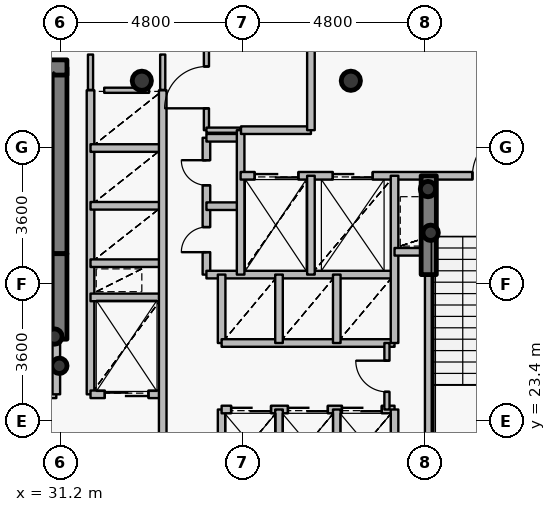
"""IFC4 building model, lengths in metres.
Left out: names, types, materials, properties, quantities, classifications, styles, units other than length and angle.
Written with IfcOpenShell. Run it as: python <this file> out.ifc"""

import sys

from ifc_helpers import new_model, si_unit, direction, frame, frame_2d, origin, origin_2d, place, context, subcontext, project, spatial, rectangle, hollow_circle, extrude, source, transform, mapped, element, fill, save


model = new_model("IFC4")
c1 = context("Model", 3, precision=1e-05, world=origin(), true_north=direction((0.0, 1.0)))
c2 = subcontext(c1, "Body", "Model", "MODEL_VIEW")
j1 = project(units=[si_unit("LENGTHUNIT", "METRE"), si_unit("PLANEANGLEUNIT", "RADIAN")], contexts=[c1])
p1 = place(None, origin())
s1 = spatial("IfcSite", under=j1, at=p1, CompositionType="ELEMENT")
p2 = place(p1, origin())
s2 = spatial("IfcBuilding", under=s1, at=p2, CompositionType="ELEMENT")
p3 = place(p2, frame((0.0, 0.0, 74.4)))
s3 = spatial("IfcBuildingStorey", under=s2, at=p3, CompositionType="ELEMENT", Elevation=74.4)
for number, where, z_axis, x_axis in (
    (1, (38.85, 32.35, 0.0), (0.0, 0.0, 1.0), (1.0, 0.0, 0.0)),
    (2, (33.35, 32.35, 0.0), (0.0, 0.0, 1.0), (1.0, 0.0, 0.0)),
):
    element("IfcColumn", number, at=place(p3, frame(where, z_axis=z_axis, x_axis=x_axis)), inside=s3, PredefinedType="COLUMN", context=c2, shape_type="SweptSolid", body=[
        extrude(hollow_circle(Radius=0.254, WallThickness=0.02, at=origin_2d()), origin(), (0.0, 0.0, 1.0), 4.2),
    ])
p4 = place(p3, frame((31.18, 27.8, 0.0), z_axis=(0.0, 0.0, 1.0), x_axis=(0.0, 1.0, 0.0)))
e3 = element("IfcWall", 3, at=p4, inside=s3, PredefinedType="SHEAR", context=c2, shape_type="SweptSolid", body=[
    extrude(rectangle(XDim=4.9, YDim=0.4, at=frame_2d((2.45, 0.0))), origin(), (0.0, 0.0, 1.0), 4.2),
])
p5 = place(p3, frame((27.28, 32.7, 0.0), z_axis=(0.0, 0.0, 1.0), x_axis=(1.0, 0.0, 0.0)))
e4 = element("IfcWall", 4, at=p5, inside=s3, PredefinedType="SHEAR", context=c2, shape_type="SweptSolid", body=[
    extrude(rectangle(XDim=4.1, YDim=0.4, at=frame_2d((2.05, 0.0))), origin(), (0.0, 0.0, 1.0), 4.2),
])
for number, where, z_axis, x_axis in (
    (5, (31.05, 25.62, 0.0), (0.0, 0.0, 1.0), (1.0, 0.0, 0.0)),
    (6, (31.18, 24.85, 0.0), (0.0, 0.0, 1.0), (1.0, 0.0, 0.0)),
    (7, (40.95, 28.35, 0.0), (0.0, 0.0, 1.0), (1.0, 0.0, 0.0)),
    (8, (40.88, 29.5, 0.0), (0.0, 0.0, 1.0), (1.0, 0.0, 0.0)),
):
    element("IfcColumn", number, at=place(p3, frame(where, z_axis=z_axis, x_axis=x_axis)), inside=s3, PredefinedType="COLUMN", context=c2, shape_type="SweptSolid", body=[
        extrude(hollow_circle(Radius=0.203, WallThickness=0.016, at=origin_2d()), origin(), (0.0, 0.0, 1.0), 4.2),
    ])
p6 = place(p3, frame((31.18, 25.55, 0.0), z_axis=(0.0, 0.0, 1.0), x_axis=(0.0, 1.0, 0.0)))
e9 = element("IfcWall", 9, at=p6, inside=s3, PredefinedType="SHEAR", context=c2, shape_type="SweptSolid", body=[
    extrude(rectangle(XDim=2.25, YDim=0.4, at=frame_2d((1.125, 0.0))), origin(), (0.0, 0.0, 1.0), 3.55),
])
p7 = place(p3, frame((40.9, 27.25, 0.0), z_axis=(0.0, 0.0, 1.0), x_axis=(0.0, 1.0, 0.0)))
e10 = element("IfcWall", 10, at=p7, inside=s3, PredefinedType="SHEAR", context=c2, shape_type="SweptSolid", body=[
    extrude(rectangle(XDim=2.6, YDim=0.4, at=frame_2d((1.3, 0.0))), origin(), (0.0, 0.0, 1.0), 3.55),
])
p8 = place(p3, frame((27.56, 24.1, 0.0), z_axis=(0.0, 0.0, 1.0), x_axis=(1.0, 0.0, 0.0)))
e11 = element("IfcWall", 11, at=p8, inside=s3, PredefinedType="PARTITIONING", context=c2, shape_type="SweptSolid", body=[
    extrude(rectangle(XDim=3.54, YDim=0.2, at=frame_2d((1.77, 0.0))), origin(), (0.0, 0.0, 1.0), 3.95),
])
p9 = place(p8, frame((1.17, 0.0, 0.0)))
e12 = element("IfcOpeningElement", 12, at=p9, cuts=e11, PredefinedType="OPENING", context=c2, shape_type="SweptSolid", body=[
    extrude(rectangle(XDim=1.2, YDim=2.15, at=origin_2d()), frame((0.6, 0.11, 1.075), z_axis=(0.0, -1.0, 0.0), x_axis=(1.0, 0.0, 0.0)), (0.0, 0.0, 1.0), 0.22),
])
p10 = place(p3, frame((31.1, 24.1, 0.0), z_axis=(0.0, 0.0, 1.0), x_axis=(0.0, 1.0, 0.0)))
e13 = element("IfcWall", 13, at=p10, inside=s3, PredefinedType="PARTITIONING", context=c2, shape_type="SweptSolid", body=[
    extrude(rectangle(XDim=1.44, YDim=0.2, at=frame_2d((0.72, 0.0))), origin(), (0.0, 0.0, 1.0), 3.95),
])
p11 = place(p3, frame((32.0, 24.1, 0.0), z_axis=(0.0, 0.0, 1.0), x_axis=(0.0, 1.0, 0.0)))
e14 = element("IfcWall", 14, at=p11, inside=s3, PredefinedType="PARTITIONING", context=c2, shape_type="SweptSolid", body=[
    extrude(rectangle(XDim=8.0, YDim=0.2, at=frame_2d((4.0, 0.0))), origin(), (0.0, 0.0, 1.0), 3.95),
])
p12 = place(p3, frame((32.0, 24.1, 0.0), z_axis=(0.0, 0.0, 1.0), x_axis=(1.0, 0.0, 0.0)))
e15 = element("IfcWall", 15, at=p12, inside=s3, PredefinedType="PARTITIONING", context=c2, shape_type="SweptSolid", body=[
    extrude(rectangle(XDim=1.9, YDim=0.2, at=frame_2d((0.95, 0.0))), origin(), (0.0, 0.0, 1.0), 3.535),
])
p13 = place(p12, frame((0.375, 0.0, 0.0)))
e16 = element("IfcOpeningElement", 16, at=p13, cuts=e15, PredefinedType="OPENING", context=c2, shape_type="SweptSolid", body=[
    extrude(rectangle(XDim=1.15, YDim=2.15, at=origin_2d()), frame((0.575, 0.11, 1.075), z_axis=(0.0, -1.0, 0.0), x_axis=(1.0, 0.0, 0.0)), (0.0, 0.0, 1.0), 0.22),
])
for number, where, z_axis, x_axis in (
    (17, (32.0, 26.65, 0.0), (0.0, 0.0, 1.0), (1.0, 0.0, 0.0)),
    (18, (32.0, 27.55, 0.0), (0.0, 0.0, 1.0), (1.0, 0.0, 0.0)),
    (19, (32.0, 29.06, 0.0), (0.0, 0.0, 1.0), (1.0, 0.0, 0.0)),
    (20, (32.0, 30.58, 0.0), (0.0, 0.0, 1.0), (1.0, 0.0, 0.0)),
):
    element("IfcWall", number, at=place(p3, frame(where, z_axis=z_axis, x_axis=x_axis)), inside=s3, PredefinedType="PARTITIONING", context=c2, shape_type="SweptSolid", body=[
        extrude(rectangle(XDim=1.9, YDim=0.2, at=frame_2d((0.95, 0.0))), origin(), (0.0, 0.0, 1.0), 3.535),
    ])
p14 = place(p3, frame((33.9, 20.7, 0.0), z_axis=(0.0, 0.0, 1.0), x_axis=(0.0, 1.0, 0.0)))
e21 = element("IfcWall", 21, at=p14, inside=s3, PredefinedType="PARTITIONING", context=c2, shape_type="SweptSolid", body=[
    extrude(rectangle(XDim=11.4, YDim=0.2, at=frame_2d((5.7, 0.0))), origin(), (0.0, 0.0, 1.0), 3.535),
])
p15 = place(p3, frame((35.05, 27.25, 0.0), z_axis=(0.0, 0.0, 1.0), x_axis=(0.0, 1.0, 0.0)))
e22 = element("IfcWall", 22, at=p15, inside=s3, PredefinedType="PARTITIONING", context=c2, shape_type="SweptSolid", body=[
    extrude(rectangle(XDim=3.6, YDim=0.2, at=frame_2d((1.8, 0.0))), origin(), (0.0, 0.0, 1.0), 3.95),
])
p16 = place(p15, frame((0.59, 0.0, 0.0)))
e23 = element("IfcOpeningElement", 23, at=p16, cuts=e22, PredefinedType="OPENING", context=c2, shape_type="SweptSolid", body=[
    extrude(rectangle(XDim=0.66, YDim=2.05, at=origin_2d()), frame((0.33, 0.11, 1.025), z_axis=(0.0, -1.0, 0.0), x_axis=(1.0, 0.0, 0.0)), (0.0, 0.0, 1.0), 0.22),
])
p17 = place(p15, frame((2.35, 0.0, 0.0)))
e24 = element("IfcOpeningElement", 24, at=p17, cuts=e22, PredefinedType="OPENING", context=c2, shape_type="SweptSolid", body=[
    extrude(rectangle(XDim=0.66, YDim=2.05, at=origin_2d()), frame((0.33, 0.11, 1.025), z_axis=(0.0, -1.0, 0.0), x_axis=(1.0, 0.0, 0.0)), (0.0, 0.0, 1.0), 0.22),
])
p18 = place(p3, frame((35.05, 27.25, 0.0), z_axis=(0.0, 0.0, 1.0), x_axis=(1.0, 0.0, 0.0)))
e25 = element("IfcWall", 25, at=p18, inside=s3, PredefinedType="PARTITIONING", context=c2, shape_type="SweptSolid", body=[
    extrude(rectangle(XDim=4.95, YDim=0.2, at=frame_2d((2.475, 0.0))), origin(), (0.0, 0.0, 1.0), 3.535),
])
for number, where, z_axis, x_axis in (
    (26, (35.05, 29.05, 0.0), (0.0, 0.0, 1.0), (1.0, 0.0, 0.0)),
    (27, (35.05, 30.85, 0.0), (0.0, 0.0, 1.0), (1.0, 0.0, 0.0)),
):
    element("IfcWall", number, at=place(p3, frame(where, z_axis=z_axis, x_axis=x_axis)), inside=s3, PredefinedType="PARTITIONING", context=c2, shape_type="SweptSolid", body=[
        extrude(rectangle(XDim=0.9, YDim=0.2, at=frame_2d((0.45, 0.0))), origin(), (0.0, 0.0, 1.0), 3.95),
    ])
p19 = place(p3, frame((35.05, 31.05, 0.0), z_axis=(0.0, 0.0, 1.0), x_axis=(0.0, 1.0, 0.0)))
e28 = element("IfcWall", 28, at=p19, inside=s3, PredefinedType="PARTITIONING", context=c2, shape_type="SweptSolid", body=[
    extrude(rectangle(XDim=2.25, YDim=0.135, at=frame_2d((1.125, 0.0))), origin(), (0.0, 0.0, 1.0), 3.535),
])
p20 = place(p19, frame((0.575, 0.0, 0.0)))
e29 = element("IfcOpeningElement", 29, at=p20, cuts=e28, PredefinedType="OPENING", context=c2, shape_type="SweptSolid", body=[
    extrude(rectangle(XDim=1.1, YDim=2.15, at=origin_2d()), frame((0.55, 0.078, 1.075), z_axis=(0.0, -1.0, 0.0), x_axis=(1.0, 0.0, 0.0)), (0.0, 0.0, 1.0), 0.155),
])
p21 = place(p3, frame((35.05, 31.05, 0.0), z_axis=(0.0, 0.0, 1.0), x_axis=(1.0, 0.0, 0.0)))
e30 = element("IfcWall", 30, at=p21, inside=s3, PredefinedType="PARTITIONING", context=c2, shape_type="SweptSolid", body=[
    extrude(rectangle(XDim=0.9, YDim=0.135, at=frame_2d((0.45, 0.0))), origin(), (0.0, 0.0, 1.0), 3.95),
])
p22 = place(p3, frame((35.45, 21.9, 0.0), z_axis=(0.0, 0.0, 1.0), x_axis=(0.0, 1.0, 0.0)))
e31 = element("IfcWall", 31, at=p22, inside=s3, PredefinedType="PARTITIONING", context=c2, shape_type="SweptSolid", body=[
    extrude(rectangle(XDim=1.8, YDim=0.2, at=frame_2d((0.9, 0.0))), origin(), (0.0, 0.0, 1.0), 3.95),
])
p23 = place(p3, frame((35.45, 23.7, 0.0), z_axis=(0.0, 0.0, 1.0), x_axis=(1.0, 0.0, 0.0)))
e32 = element("IfcWall", 32, at=p23, inside=s3, PredefinedType="PARTITIONING", context=c2, shape_type="SweptSolid", body=[
    extrude(rectangle(XDim=4.55, YDim=0.2, at=frame_2d((2.275, 0.0))), origin(), (0.0, 0.0, 1.0), 3.535),
])
p24 = place(p23, frame((0.25, 0.0, 0.0)))
e33 = element("IfcOpeningElement", 33, at=p24, cuts=e32, PredefinedType="OPENING", context=c2, shape_type="SweptSolid", body=[
    extrude(rectangle(XDim=1.05, YDim=2.15, at=origin_2d()), frame((0.525, 0.11, 1.075), z_axis=(0.0, -1.0, 0.0), x_axis=(1.0, 0.0, 0.0)), (0.0, 0.0, 1.0), 0.22),
])
p25 = place(p23, frame((1.745, 0.0, 0.0)))
e34 = element("IfcOpeningElement", 34, at=p25, cuts=e32, PredefinedType="OPENING", context=c2, shape_type="SweptSolid", body=[
    extrude(rectangle(XDim=1.05, YDim=2.15, at=origin_2d()), frame((0.525, 0.11, 1.075), z_axis=(0.0, -1.0, 0.0), x_axis=(1.0, 0.0, 0.0)), (0.0, 0.0, 1.0), 0.22),
])
p26 = place(p23, frame((3.165, 0.0, 0.0)))
e35 = element("IfcOpeningElement", 35, at=p26, cuts=e32, PredefinedType="OPENING", context=c2, shape_type="SweptSolid", body=[
    extrude(rectangle(XDim=1.05, YDim=2.15, at=origin_2d()), frame((0.525, 0.11, 1.075), z_axis=(0.0, -1.0, 0.0), x_axis=(1.0, 0.0, 0.0)), (0.0, 0.0, 1.0), 0.22),
])
p27 = place(p3, frame((35.45, 25.45, 0.0), z_axis=(0.0, 0.0, 1.0), x_axis=(0.0, 1.0, 0.0)))
e36 = element("IfcWall", 36, at=p27, inside=s3, PredefinedType="PARTITIONING", context=c2, shape_type="SweptSolid", body=[
    extrude(rectangle(XDim=1.8, YDim=0.2, at=frame_2d((0.9, 0.0))), origin(), (0.0, 0.0, 1.0), 3.95),
])
p28 = place(p3, frame((35.45, 25.45, 0.0), z_axis=(0.0, 0.0, 1.0), x_axis=(1.0, 0.0, 0.0)))
e37 = element("IfcWall", 37, at=p28, inside=s3, PredefinedType="PARTITIONING", context=c2, shape_type="SweptSolid", body=[
    extrude(rectangle(XDim=4.55, YDim=0.2, at=frame_2d((2.275, 0.0))), origin(), (0.0, 0.0, 1.0), 3.535),
])
p29 = place(p3, frame((35.95, 27.25, 0.0), z_axis=(0.0, 0.0, 1.0), x_axis=(0.0, 1.0, 0.0)))
e38 = element("IfcWall", 38, at=p29, inside=s3, PredefinedType="PARTITIONING", context=c2, shape_type="SweptSolid", body=[
    extrude(rectangle(XDim=3.8, YDim=0.2, at=frame_2d((1.9, 0.0))), origin(), (0.0, 0.0, 1.0), 3.95),
])
p30 = place(p3, frame((35.95, 29.85, 0.0), z_axis=(0.0, 0.0, 1.0), x_axis=(1.0, 0.0, 0.0)))
e39 = element("IfcWall", 39, at=p30, inside=s3, PredefinedType="PARTITIONING", context=c2, shape_type="SweptSolid", body=[
    extrude(rectangle(XDim=8.49, YDim=0.2, at=frame_2d((4.245, 0.0))), origin(), (0.0, 0.0, 1.0), 3.535),
])
p31 = place(p30, frame((6.1, 0.0, 0.0)))
e40 = element("IfcOpeningElement", 40, at=p31, cuts=e39, PredefinedType="OPENING", context=c2, shape_type="SweptSolid", body=[
    extrude(rectangle(XDim=1.2, YDim=2.15, at=origin_2d()), frame((0.6, 0.11, 1.075), z_axis=(0.0, -1.0, 0.0), x_axis=(1.0, 0.0, 0.0)), (0.0, 0.0, 1.0), 0.22),
])
p32 = place(p30, frame((0.37, 0.0, 0.0)))
e41 = element("IfcOpeningElement", 41, at=p32, cuts=e39, PredefinedType="OPENING", context=c2, shape_type="SweptSolid", body=[
    extrude(rectangle(XDim=1.15, YDim=2.15, at=origin_2d()), frame((0.575, 0.11, 1.075), z_axis=(0.0, -1.0, 0.0), x_axis=(1.0, 0.0, 0.0)), (0.0, 0.0, 1.0), 0.22),
])
p33 = place(p30, frame((2.425, 0.0, 0.0)))
e42 = element("IfcOpeningElement", 42, at=p33, cuts=e39, PredefinedType="OPENING", context=c2, shape_type="SweptSolid", body=[
    extrude(rectangle(XDim=1.05, YDim=2.15, at=origin_2d()), frame((0.525, 0.11, 1.075), z_axis=(0.0, -1.0, 0.0), x_axis=(1.0, 0.0, 0.0)), (0.0, 0.0, 1.0), 0.22),
])
p34 = place(p3, frame((35.96, 31.05, 0.0), z_axis=(0.0, 0.0, 1.0), x_axis=(1.0, 0.0, 0.0)))
e43 = element("IfcWall", 43, at=p34, inside=s3, PredefinedType="PARTITIONING", context=c2, shape_type="SweptSolid", body=[
    extrude(rectangle(XDim=1.84, YDim=0.2, at=frame_2d((0.92, 0.0))), origin(), (0.0, 0.0, 1.0), 3.95),
])
for number, where, z_axis, x_axis in (
    (44, (36.96, 21.9, 0.0), (0.0, 0.0, 1.0), (0.0, 1.0, 0.0)),
    (45, (36.96, 25.45, 0.0), (0.0, 0.0, 1.0), (0.0, 1.0, 0.0)),
):
    element("IfcWall", number, at=place(p3, frame(where, z_axis=z_axis, x_axis=x_axis)), inside=s3, PredefinedType="PARTITIONING", context=c2, shape_type="SweptSolid", body=[
        extrude(rectangle(XDim=1.8, YDim=0.2, at=frame_2d((0.9, 0.0))), origin(), (0.0, 0.0, 1.0), 3.95),
    ])
p35 = place(p3, frame((37.8, 27.25, 0.0), z_axis=(0.0, 0.0, 1.0), x_axis=(0.0, 1.0, 0.0)))
e46 = element("IfcWall", 46, at=p35, inside=s3, PredefinedType="PARTITIONING", context=c2, shape_type="SweptSolid", body=[
    extrude(rectangle(XDim=2.6, YDim=0.2, at=frame_2d((1.3, 0.0))), origin(), (0.0, 0.0, 1.0), 3.95),
])
p36 = place(p3, frame((37.8, 31.05, 0.0), z_axis=(0.0, 0.0, 1.0), x_axis=(0.0, 1.0, 0.0)))
e47 = element("IfcWall", 47, at=p36, inside=s3, PredefinedType="PARTITIONING", context=c2, shape_type="SweptSolid", body=[
    extrude(rectangle(XDim=2.25, YDim=0.2, at=frame_2d((1.125, 0.0))), origin(), (0.0, 0.0, 1.0), 3.535),
])
for number, where, z_axis, x_axis in (
    (48, (38.48, 21.9, 0.0), (0.0, 0.0, 1.0), (0.0, 1.0, 0.0)),
    (49, (38.48, 25.45, 0.0), (0.0, 0.0, 1.0), (0.0, 1.0, 0.0)),
):
    element("IfcWall", number, at=place(p3, frame(where, z_axis=z_axis, x_axis=x_axis)), inside=s3, PredefinedType="PARTITIONING", context=c2, shape_type="SweptSolid", body=[
        extrude(rectangle(XDim=1.8, YDim=0.2, at=frame_2d((0.9, 0.0))), origin(), (0.0, 0.0, 1.0), 3.95),
    ])
p37 = place(p3, frame((39.8, 23.7, 0.0), z_axis=(0.0, 0.0, 1.0), x_axis=(0.0, 1.0, 0.0)))
e50 = element("IfcWall", 50, at=p37, inside=s3, PredefinedType="PARTITIONING", context=c2, shape_type="SweptSolid", body=[
    extrude(rectangle(XDim=1.75, YDim=0.135, at=frame_2d((0.875, 0.0))), origin(), (0.0, 0.0, 1.0), 3.95),
])
p38 = place(p37, frame((0.465, 0.0, 0.0)))
e51 = element("IfcOpeningElement", 51, at=p38, cuts=e50, PredefinedType="OPENING", context=c2, shape_type="SweptSolid", body=[
    extrude(rectangle(XDim=0.82, YDim=2.1, at=origin_2d()), frame((0.41, 0.078, 1.05), z_axis=(0.0, -1.0, 0.0), x_axis=(1.0, 0.0, 0.0)), (0.0, 0.0, 1.0), 0.155),
])
p39 = place(p3, frame((40.0, 21.9, 0.0), z_axis=(0.0, 0.0, 1.0), x_axis=(0.0, 1.0, 0.0)))
e52 = element("IfcWall", 52, at=p39, inside=s3, PredefinedType="PARTITIONING", context=c2, shape_type="SweptSolid", body=[
    extrude(rectangle(XDim=1.8, YDim=0.2, at=frame_2d((0.9, 0.0))), origin(), (0.0, 0.0, 1.0), 3.95),
])
p40 = place(p3, frame((40.0, 25.45, 0.0), z_axis=(0.0, 0.0, 1.0), x_axis=(0.0, 1.0, 0.0)))
e53 = element("IfcWall", 53, at=p40, inside=s3, PredefinedType="PARTITIONING", context=c2, shape_type="SweptSolid", body=[
    extrude(rectangle(XDim=4.4, YDim=0.2, at=frame_2d((2.2, 0.0))), origin(), (0.0, 0.0, 1.0), 3.95),
])
p41 = place(p3, frame((40.0, 27.85, 0.0), z_axis=(0.0, 0.0, 1.0), x_axis=(1.0, 0.0, 0.0)))
e54 = element("IfcWall", 54, at=p41, inside=s3, PredefinedType="PARTITIONING", context=c2, shape_type="SweptSolid", body=[
    extrude(rectangle(XDim=0.9, YDim=0.2, at=frame_2d((0.45, 0.0))), origin(), (0.0, 0.0, 1.0), 3.95),
])
p42 = place(p3, frame((40.9, 21.33, 0.0), z_axis=(0.0, 0.0, 1.0), x_axis=(0.0, 1.0, 0.0)))
e55 = element("IfcWall", 55, at=p42, inside=s3, PredefinedType="PARTITIONING", context=c2, shape_type="SweptSolid", body=[
    extrude(rectangle(XDim=5.91, YDim=0.2, at=frame_2d((2.955, 0.0))), origin(), (0.0, 0.0, 1.0), 3.485),
])
p43 = place(p3, frame((32.36, 32.1, 0.0), z_axis=(0.0, 0.0, 1.0), x_axis=(1.0, 0.0, 0.0)))
e56 = element("IfcWall", 56, at=p43, inside=s3, PredefinedType="PARTITIONING", context=c2, shape_type="SweptSolid", body=[
    extrude(rectangle(XDim=1.18, YDim=0.135, at=frame_2d((0.59, 0.0))), origin(), (0.0, 0.0, 1.0), 3.535),
])
p44 = place(p3, frame((32.0, 33.04, 0.0), z_axis=(0.0, 0.0, 1.0), x_axis=(0.0, -1.0, 0.0)))
e57 = element("IfcWall", 57, at=p44, inside=s3, PredefinedType="PARTITIONING", context=c2, shape_type="SweptSolid", body=[
    extrude(rectangle(XDim=0.93, YDim=0.135, at=frame_2d((0.465, 0.0))), origin(), (0.0, 0.0, 1.0), 3.485),
])
p45 = place(p3, frame((33.9, 32.11, 0.0), z_axis=(0.0, 0.0, 1.0), x_axis=(0.0, 1.0, 0.0)))
e58 = element("IfcWall", 58, at=p45, inside=s3, PredefinedType="PARTITIONING", context=c2, shape_type="SweptSolid", body=[
    extrude(rectangle(XDim=0.93, YDim=0.135, at=frame_2d((0.465, 0.0))), origin(), (0.0, 0.0, 1.0), 3.535),
])
m1 = source(origin(), c2, "Body", "SweptSolid", [
    extrude(rectangle(XDim=1.2, YDim=2.15, at=origin_2d()), frame((0.6, 0.025, 1.075), z_axis=(0.0, -1.0, 0.0), x_axis=(1.0, 0.0, 0.0)), (0.0, 0.0, 1.0), 0.05),
])
p46 = place(p31, origin())
e59 = element("IfcDoor", 59, at=p46, inside=s3, OperationType="SINGLE_SWING_RIGHT", PredefinedType="DOOR", context=c2, shape_type="MappedRepresentation", body=[
    mapped(m1, transform((0.0, 0.0, 0.0), x_axis=(1.0, 0.0, 0.0), y_axis=(0.0, 1.0, 0.0), z_axis=(0.0, 0.0, 1.0), scale=1.0)),
])
fill(e40, e59)
m2 = source(origin(), c2, "Body", "SweptSolid", [
    extrude(rectangle(XDim=1.15, YDim=2.15, at=origin_2d()), frame((0.575, 0.025, 1.075), z_axis=(0.0, -1.0, 0.0), x_axis=(1.0, 0.0, 0.0)), (0.0, 0.0, 1.0), 0.05),
])
p47 = place(p32, origin())
e60 = element("IfcDoor", 60, at=p47, inside=s3, OperationType="DOUBLE_DOOR_SLIDING", PredefinedType="USERDEFINED", context=c2, shape_type="MappedRepresentation", body=[
    mapped(m2, transform((0.0, 0.0, 0.0), x_axis=(1.0, 0.0, 0.0), y_axis=(0.0, 1.0, 0.0), z_axis=(0.0, 0.0, 1.0), scale=1.0)),
])
fill(e41, e60)
p48 = place(p13, origin())
e61 = element("IfcDoor", 61, at=p48, inside=s3, OperationType="DOUBLE_DOOR_SLIDING", PredefinedType="USERDEFINED", context=c2, shape_type="MappedRepresentation", body=[
    mapped(m2, transform((0.0, 0.0, 0.0), x_axis=(1.0, 0.0, 0.0), y_axis=(0.0, 1.0, 0.0), z_axis=(0.0, 0.0, 1.0), scale=1.0)),
])
fill(e16, e61)
m3 = source(origin(), c2, "Body", "SweptSolid", [
    extrude(rectangle(XDim=1.05, YDim=2.15, at=origin_2d()), frame((0.525, 0.025, 1.075), z_axis=(0.0, -1.0, 0.0), x_axis=(1.0, 0.0, 0.0)), (0.0, 0.0, 1.0), 0.05),
])
p49 = place(p33, origin())
e62 = element("IfcDoor", 62, at=p49, inside=s3, OperationType="DOUBLE_DOOR_SLIDING", PredefinedType="USERDEFINED", context=c2, shape_type="MappedRepresentation", body=[
    mapped(m3, transform((0.0, 0.0, 0.0), x_axis=(1.0, 0.0, 0.0), y_axis=(0.0, 1.0, 0.0), z_axis=(0.0, 0.0, 1.0), scale=1.0)),
])
fill(e42, e62)
p50 = place(p24, origin())
e63 = element("IfcDoor", 63, at=p50, inside=s3, OperationType="DOUBLE_DOOR_SLIDING", PredefinedType="USERDEFINED", context=c2, shape_type="MappedRepresentation", body=[
    mapped(m3, transform((0.0, 0.0, 0.0), x_axis=(1.0, 0.0, 0.0), y_axis=(0.0, 1.0, 0.0), z_axis=(0.0, 0.0, 1.0), scale=1.0)),
])
fill(e33, e63)
p51 = place(p25, origin())
e64 = element("IfcDoor", 64, at=p51, inside=s3, OperationType="DOUBLE_DOOR_SLIDING", PredefinedType="USERDEFINED", context=c2, shape_type="MappedRepresentation", body=[
    mapped(m3, transform((0.0, 0.0, 0.0), x_axis=(1.0, 0.0, 0.0), y_axis=(0.0, 1.0, 0.0), z_axis=(0.0, 0.0, 1.0), scale=1.0)),
])
fill(e34, e64)
p52 = place(p26, origin())
e65 = element("IfcDoor", 65, at=p52, inside=s3, OperationType="DOUBLE_DOOR_SLIDING", PredefinedType="USERDEFINED", context=c2, shape_type="MappedRepresentation", body=[
    mapped(m3, transform((0.0, 0.0, 0.0), x_axis=(1.0, 0.0, 0.0), y_axis=(0.0, 1.0, 0.0), z_axis=(0.0, 0.0, 1.0), scale=1.0)),
])
fill(e35, e65)
m4 = source(origin(), c2, "Body", "SweptSolid", [
    extrude(rectangle(XDim=0.66, YDim=2.05, at=origin_2d()), frame((0.33, 0.025, 1.025), z_axis=(0.0, -1.0, 0.0), x_axis=(1.0, 0.0, 0.0)), (0.0, 0.0, 1.0), 0.05),
])
p53 = place(p16, origin())
e66 = element("IfcDoor", 66, at=p53, inside=s3, OperationType="SINGLE_SWING_LEFT", PredefinedType="USERDEFINED", context=c2, shape_type="MappedRepresentation", body=[
    mapped(m4, transform((0.0, 0.0, 0.0), x_axis=(1.0, 0.0, 0.0), y_axis=(0.0, 1.0, 0.0), z_axis=(0.0, 0.0, 1.0), scale=1.0)),
])
fill(e23, e66)
p54 = place(p17, origin())
e67 = element("IfcDoor", 67, at=p54, inside=s3, OperationType="SINGLE_SWING_RIGHT", PredefinedType="USERDEFINED", context=c2, shape_type="MappedRepresentation", body=[
    mapped(m4, transform((0.0, 0.0, 0.0), x_axis=(1.0, 0.0, 0.0), y_axis=(0.0, 1.0, 0.0), z_axis=(0.0, 0.0, 1.0), scale=1.0)),
])
fill(e24, e67)
m5 = source(origin(), c2, "Body", "SweptSolid", [
    extrude(rectangle(XDim=1.1, YDim=2.15, at=origin_2d()), frame((0.55, 0.025, 1.075), z_axis=(0.0, -1.0, 0.0), x_axis=(1.0, 0.0, 0.0)), (0.0, 0.0, 1.0), 0.05),
])
p55 = place(p20, origin())
e68 = element("IfcDoor", 68, at=p55, inside=s3, OperationType="SINGLE_SWING_LEFT", PredefinedType="DOOR", context=c2, shape_type="MappedRepresentation", body=[
    mapped(m5, transform((0.0, 0.0, 0.0), x_axis=(1.0, 0.0, 0.0), y_axis=(0.0, 1.0, 0.0), z_axis=(0.0, 0.0, 1.0), scale=1.0)),
])
fill(e29, e68)
m6 = source(origin(), c2, "Body", "SweptSolid", [
    extrude(rectangle(XDim=0.82, YDim=2.1, at=origin_2d()), frame((0.41, 0.025, 1.05), z_axis=(0.0, -1.0, 0.0), x_axis=(1.0, 0.0, 0.0)), (0.0, 0.0, 1.0), 0.05),
])
p56 = place(p38, origin())
e69 = element("IfcDoor", 69, at=p56, inside=s3, OperationType="SINGLE_SWING_RIGHT", PredefinedType="DOOR", context=c2, shape_type="MappedRepresentation", body=[
    mapped(m6, transform((0.0, 0.0, 0.0), x_axis=(1.0, 0.0, 0.0), y_axis=(0.0, 1.0, 0.0), z_axis=(0.0, 0.0, 1.0), scale=1.0)),
])
fill(e51, e69)
save(model, sys.argv[1])
